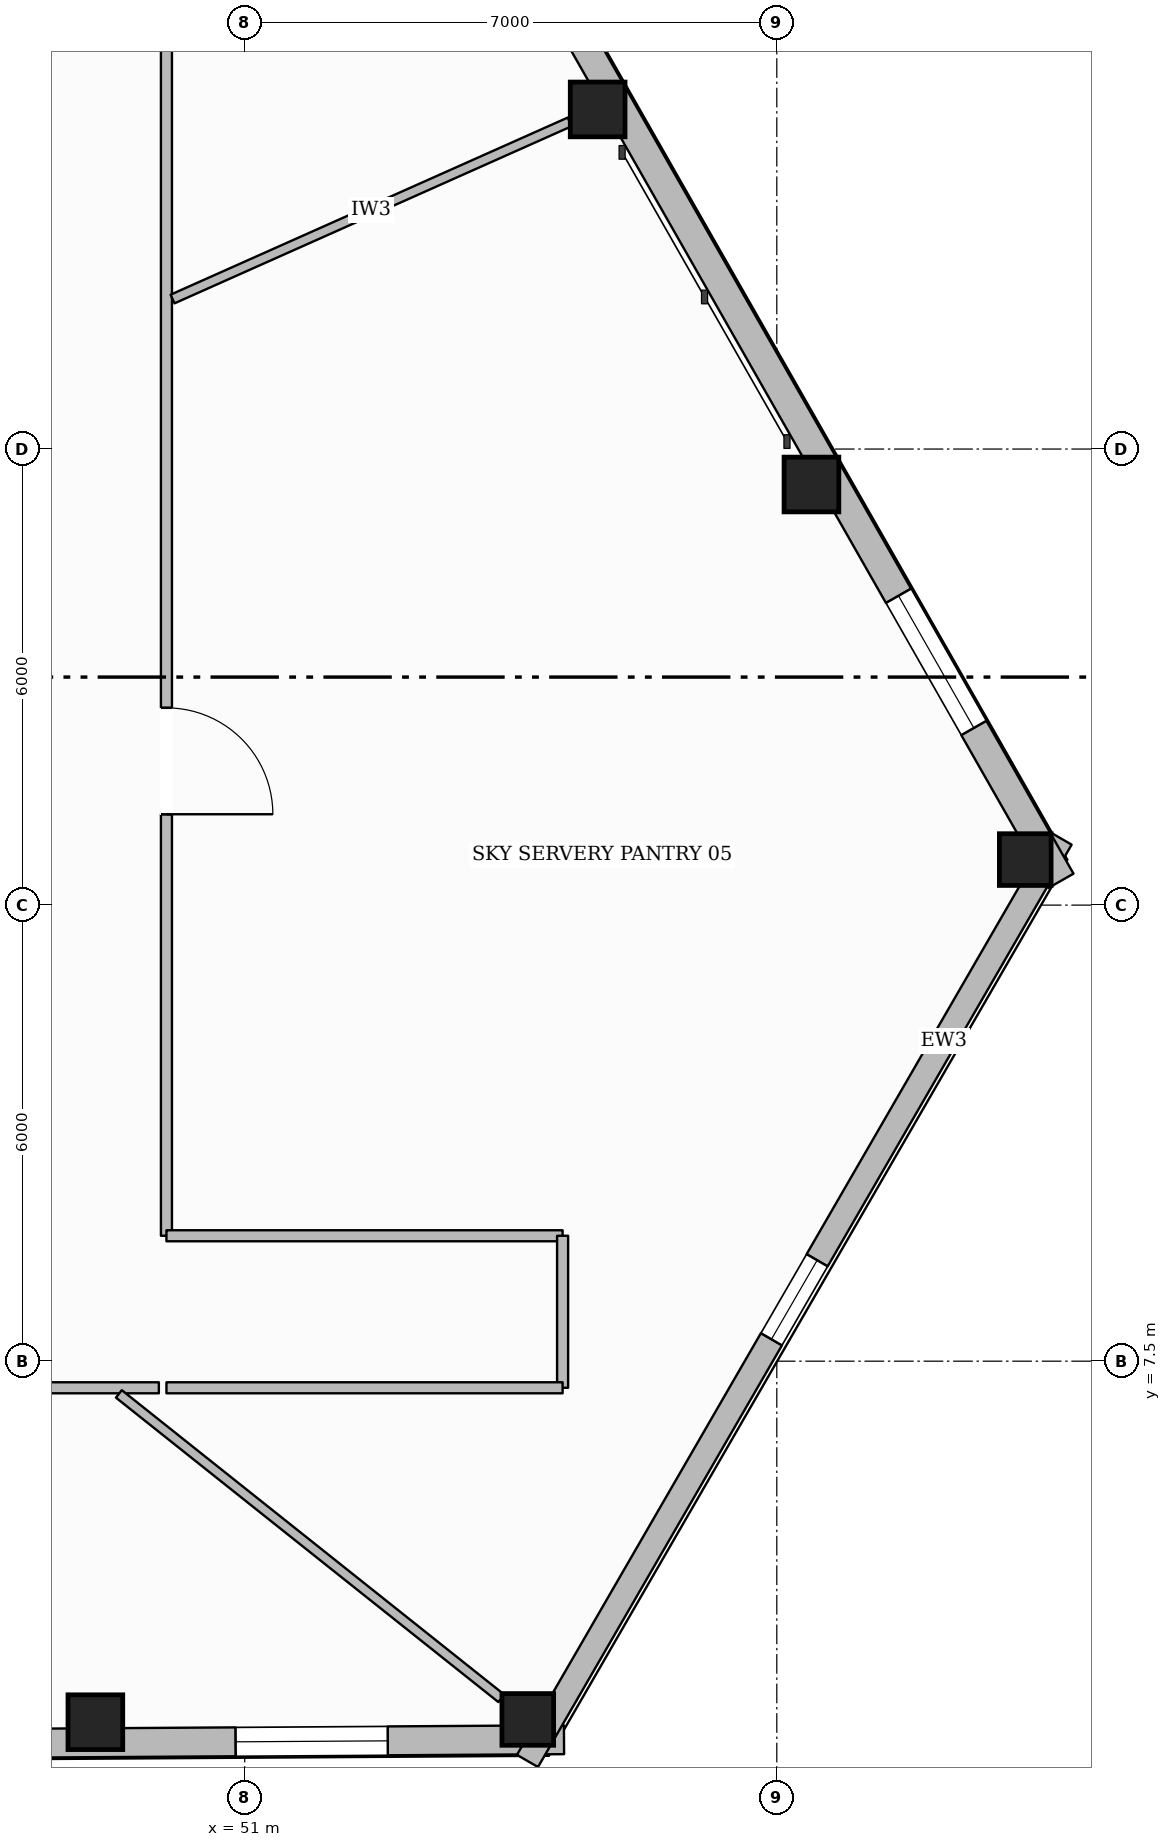
"""IFC4 building model, lengths in metres.
Left out: names, types, materials, properties, quantities, classifications, styles, units other than length and angle.
Written with IfcOpenShell. Run it as: python <this file> out.ifc"""

import sys

from ifc_helpers import new_model, si_unit, direction, frame, frame_2d, origin, origin_2d, place, context, subcontext, project, spatial, rectangle, hollow_rectangle, extrude, element, fill, save


model = new_model("IFC4")
c1 = context("Model", 3, precision=1e-05, world=origin(), true_north=direction((0.0, 1.0)))
c2 = subcontext(c1, "Body", "Model", "MODEL_VIEW")
j1 = project(units=[si_unit("LENGTHUNIT", "METRE"), si_unit("PLANEANGLEUNIT", "RADIAN")], contexts=[c1])
p1 = place(None, origin())
s1 = spatial("IfcSite", under=j1, at=p1, CompositionType="ELEMENT")
p2 = place(p1, origin())
s2 = spatial("IfcBuilding", under=s1, at=p2, CompositionType="ELEMENT")
p3 = place(p2, frame((0.0, 0.0, 80.5)))
s3 = spatial("IfcBuildingStorey", under=s2, at=p3, CompositionType="ELEMENT", Elevation=80.5)
p4 = place(p3, frame((49.035, 2.75, 0.0), z_axis=(0.0, 0.0, 1.0), x_axis=(1.0, 0.0, 0.0)))
e1 = element("IfcColumn", 1, at=p4, inside=s3, PredefinedType="COLUMN", context=c2, shape_type="SweptSolid", body=[
    extrude(hollow_rectangle(XDim=0.72, YDim=0.72, WallThickness=0.032, at=origin_2d()), origin(), (0.0, 0.0, 1.0), 4.75),
])
for number, where, z_axis, x_axis in (
    (2, (54.724, 2.787, 0.0), (0.0, 0.0, 1.0), (1.0, 0.0, 0.0)),
    (3, (61.268, 14.099, 0.0), (0.0, 0.0, 1.0), (1.0, 0.0, 0.0)),
):
    element("IfcColumn", number, at=place(p3, frame(where, z_axis=z_axis, x_axis=x_axis)), inside=s3, PredefinedType="COLUMN", context=c2, shape_type="SweptSolid", body=[
        extrude(hollow_rectangle(XDim=0.68, YDim=0.68, WallThickness=0.03, at=origin_2d()), origin(), (0.0, 0.0, 1.0), 4.75),
    ])
for number, where, z_axis, x_axis in (
    (4, (58.456, 19.033, 0.0), (0.0, 0.0, 1.0), (1.0, 0.0, 0.0)),
    (5, (55.643, 23.968, 0.0), (0.0, 0.0, 1.0), (1.0, 0.0, 0.0)),
):
    element("IfcColumn", number, at=place(p3, frame(where, z_axis=z_axis, x_axis=x_axis)), inside=s3, PredefinedType="COLUMN", context=c2, shape_type="SweptSolid", body=[
        extrude(hollow_rectangle(XDim=0.72, YDim=0.72, WallThickness=0.032, at=origin_2d()), origin(), (0.0, 0.0, 1.0), 4.75),
    ])
p5 = place(p3, frame((55.2, 2.52, 0.0), z_axis=(0.0, 0.0, 1.0), x_axis=(-0.999979379683, -0.006421854009, 0.0)))
e6 = element("IfcWall", 6, at=p5, inside=s3, PredefinedType="STANDARD", context=c2, shape_type="SweptSolid", body=[
    extrude(rectangle(XDim=35.09, YDim=0.38, at=frame_2d((17.545, 0.0))), origin(), (0.0, 0.0, 1.0), 4.209),
])
p6 = place(p5, frame((30.765, 0.0, 0.65)))
e7 = element("IfcOpeningElement", 7, at=p6, cuts=e6, PredefinedType="OPENING", context=c2, shape_type="SweptSolid", body=[
    extrude(rectangle(XDim=2.0, YDim=2.25, at=frame_2d((1.0, 1.125))), frame((0.0, 0.2, 0.0), z_axis=(0.0, -1.0, 0.0), x_axis=(1.0, 0.0, 0.0)), (0.0, 0.0, 1.0), 0.4),
])
p7 = place(p5, frame((2.319, 0.0, 0.65)))
e8 = element("IfcOpeningElement", 8, at=p7, cuts=e6, PredefinedType="OPENING", context=c2, shape_type="SweptSolid", body=[
    extrude(rectangle(XDim=2.0, YDim=2.25, at=frame_2d((1.0, 1.125))), frame((0.0, 0.2, 0.0), z_axis=(0.0, -1.0, 0.0), x_axis=(1.0, 0.0, 0.0)), (0.0, 0.0, 1.0), 0.4),
])
p8 = place(p3, frame((61.74, 14.375, 0.0), z_axis=(0.0, 0.0, 1.0), x_axis=(-0.50077538948, -0.865577269394, 0.0)))
e9 = element("IfcWall", 9, at=p8, inside=s3, PredefinedType="STANDARD", context=c2, shape_type="SweptSolid", body=[
    extrude(rectangle(XDim=14.019, YDim=0.32, at=frame_2d((7.01, 0.0))), origin(), (0.0, 0.0, 1.0), 4.209),
])
p9 = place(p8, frame((6.41, 0.0, 0.65)))
e10 = element("IfcOpeningElement", 10, at=p9, cuts=e9, PredefinedType="OPENING", context=c2, shape_type="SweptSolid", body=[
    extrude(rectangle(XDim=1.2, YDim=1.7, at=frame_2d((0.6, 0.85))), frame((0.0, 0.17, 0.0), z_axis=(0.0, -1.0, 0.0), x_axis=(1.0, 0.0, 0.0)), (0.0, 0.0, 1.0), 0.34),
])
p10 = place(p3, frame((44.389, 44.257, 0.0), z_axis=(0.0, 0.0, 1.0), x_axis=(0.495210354805, -0.868773102999, 0.0)))
e11 = element("IfcWall", 11, at=p10, inside=s3, PredefinedType="STANDARD", context=c2, shape_type="SweptSolid", body=[
    extrude(rectangle(XDim=35.035, YDim=0.38, at=frame_2d((17.518, 0.0))), origin(), (0.0, 0.0, 1.0), 4.209),
])
p11 = place(p10, frame((30.72, 0.0, 0.65)))
e12 = element("IfcOpeningElement", 12, at=p11, cuts=e11, PredefinedType="OPENING", context=c2, shape_type="SweptSolid", body=[
    extrude(rectangle(XDim=2.0, YDim=2.25, at=frame_2d((1.0, 1.125))), frame((0.0, 0.2, 0.0), z_axis=(0.0, -1.0, 0.0), x_axis=(1.0, 0.0, 0.0)), (0.0, 0.0, 1.0), 0.4),
])
p12 = place(p10, frame((2.321, 0.0, 0.65)))
e13 = element("IfcOpeningElement", 13, at=p12, cuts=e11, PredefinedType="OPENING", context=c2, shape_type="SweptSolid", body=[
    extrude(rectangle(XDim=2.0, YDim=2.25, at=frame_2d((1.0, 1.125))), frame((0.0, 0.2, 0.0), z_axis=(0.0, -1.0, 0.0), x_axis=(1.0, 0.0, 0.0)), (0.0, 0.0, 1.0), 0.4),
])
p13 = place(p3, frame((49.97, 25.05, 0.0), z_axis=(0.0, 0.0, 1.0), x_axis=(0.0, -1.0, 0.0)))
e14 = element("IfcWall", 14, at=p13, inside=s3, PredefinedType="PARTITIONING", context=c2, shape_type="SweptSolid", body=[
    extrude(rectangle(XDim=15.9, YDim=0.145, at=frame_2d((7.95, 0.0))), origin(), (0.0, 0.0, 1.0), 4.438),
])
p14 = place(p13, frame((8.955, 0.0, 0.0)))
e15 = element("IfcOpeningElement", 15, at=p14, cuts=e14, PredefinedType="OPENING", context=c2, shape_type="SweptSolid", body=[
    extrude(rectangle(XDim=1.4, YDim=2.2, at=frame_2d((0.7, 1.1))), frame((0.0, 0.083, 0.0), z_axis=(0.0, -1.0, 0.0), x_axis=(1.0, 0.0, 0.0)), (0.0, 0.0, 1.0), 0.165),
])
p15 = place(p3, frame((49.97, 9.15, 0.0), z_axis=(0.0, 0.0, 1.0), x_axis=(1.0, 0.0, 0.0)))
e16 = element("IfcWall", 16, at=p15, inside=s3, PredefinedType="PARTITIONING", context=c2, shape_type="SweptSolid", body=[
    extrude(rectangle(XDim=5.212, YDim=0.145, at=frame_2d((2.606, 0.0))), origin(), (0.0, 0.0, 1.0), 4.75),
])
p16 = place(p3, frame((55.182, 9.15, 0.0), z_axis=(0.0, 0.0, 1.0), x_axis=(0.0, -1.0, 0.0)))
e17 = element("IfcWall", 17, at=p16, inside=s3, PredefinedType="PARTITIONING", context=c2, shape_type="SweptSolid", body=[
    extrude(rectangle(XDim=2.0, YDim=0.145, at=frame_2d((1.0, 0.0))), origin(), (0.0, 0.0, 1.0), 4.75),
])
p17 = place(p3, frame((55.182, 7.15, 0.0), z_axis=(0.0, 0.0, 1.0), x_axis=(-1.0, 0.0, 0.0)))
e18 = element("IfcWall", 18, at=p17, inside=s3, PredefinedType="PARTITIONING", context=c2, shape_type="SweptSolid", body=[
    extrude(rectangle(XDim=5.212, YDim=0.145, at=frame_2d((2.606, 0.0))), origin(), (0.0, 0.0, 1.0), 4.75),
])
p18 = place(p3, frame((49.87, 7.15, 0.0), z_axis=(0.0, 0.0, 1.0), x_axis=(-1.0, 0.0, 0.0)))
e19 = element("IfcWall", 19, at=p18, inside=s3, PredefinedType="PARTITIONING", context=c2, shape_type="SweptSolid", body=[
    extrude(rectangle(XDim=23.74, YDim=0.145, at=frame_2d((11.87, 0.0))), origin(), (0.0, 0.0, 1.0), 4.75),
])
p19 = place(p18, frame((18.43, 0.0, 0.0)))
e20 = element("IfcOpeningElement", 20, at=p19, cuts=e19, PredefinedType="OPENING", context=c2, shape_type="SweptSolid", body=[
    extrude(rectangle(XDim=0.88, YDim=2.1, at=frame_2d((0.44, 1.05))), frame((0.0, 0.083, 0.0), z_axis=(0.0, -1.0, 0.0), x_axis=(1.0, 0.0, 0.0)), (0.0, 0.0, 1.0), 0.165),
])
p20 = place(p18, frame((15.91, 0.0, 0.0)))
e21 = element("IfcOpeningElement", 21, at=p20, cuts=e19, PredefinedType="OPENING", context=c2, shape_type="SweptSolid", body=[
    extrude(rectangle(XDim=0.88, YDim=2.1, at=frame_2d((0.44, 1.05))), frame((0.0, 0.083, 0.0), z_axis=(0.0, -1.0, 0.0), x_axis=(1.0, 0.0, 0.0)), (0.0, 0.0, 1.0), 0.165),
])
p21 = place(p18, frame((13.45, 0.0, 0.0)))
e22 = element("IfcOpeningElement", 22, at=p21, cuts=e19, PredefinedType="OPENING", context=c2, shape_type="SweptSolid", body=[
    extrude(rectangle(XDim=0.96, YDim=2.1, at=frame_2d((0.48, 1.05))), frame((0.0, 0.083, 0.0), z_axis=(0.0, -1.0, 0.0), x_axis=(1.0, 0.0, 0.0)), (0.0, 0.0, 1.0), 0.165),
])
p22 = place(p18, frame((5.857, 0.0, 0.0)))
e23 = element("IfcOpeningElement", 23, at=p22, cuts=e19, PredefinedType="OPENING", context=c2, shape_type="SweptSolid", body=[
    extrude(rectangle(XDim=1.02, YDim=2.15, at=frame_2d((0.51, 1.075))), frame((0.0, 0.083, 0.0), z_axis=(0.0, -1.0, 0.0), x_axis=(1.0, 0.0, 0.0)), (0.0, 0.0, 1.0), 0.165),
])
p23 = place(p3, frame((50.051, 21.474, 0.0), z_axis=(0.0, 0.0, 1.0), x_axis=(0.91329866802, 0.407290489692, 0.0)))
e24 = element("IfcWall", 24, at=p23, inside=s3, PredefinedType="PARTITIONING", context=c2, shape_type="SweptSolid", body=[
    extrude(rectangle(XDim=5.72, YDim=0.125, at=frame_2d((2.86, 0.0))), origin(), (0.0, 0.0, 1.0), 4.291),
])
p24 = place(p3, frame((49.344, 7.07, 0.0), z_axis=(0.0, 0.0, 1.0), x_axis=(0.782366462382, -0.622818367215, 0.0)))
e25 = element("IfcWall", 25, at=p24, inside=s3, PredefinedType="PARTITIONING", context=c2, shape_type="SweptSolid", body=[
    extrude(rectangle(XDim=6.431, YDim=0.125, at=frame_2d((3.216, 0.0))), origin(), (0.0, 0.0, 1.0), 4.291),
])
p25 = place(p7, origin())
e26 = element("IfcWindow", 26, at=p25, inside=s3, PartitioningType="SINGLE_PANEL", PredefinedType="WINDOW", context=c2, shape_type="SweptSolid", body=[
    extrude(rectangle(XDim=2.0, YDim=2.25, at=frame_2d((1.0, 1.125))), frame((0.0, 0.03, 0.0), z_axis=(0.0, -1.0, 0.0), x_axis=(1.0, 0.0, 0.0)), (0.0, 0.0, 1.0), 0.06),
])
fill(e8, e26)
p26 = place(p11, origin())
e27 = element("IfcWindow", 27, at=p26, inside=s3, PartitioningType="SINGLE_PANEL", PredefinedType="WINDOW", context=c2, shape_type="SweptSolid", body=[
    extrude(rectangle(XDim=2.0, YDim=2.25, at=frame_2d((1.0, 1.125))), frame((0.0, 0.03, 0.0), z_axis=(0.0, -1.0, 0.0), x_axis=(1.0, 0.0, 0.0)), (0.0, 0.0, 1.0), 0.06),
])
fill(e12, e27)
p27 = place(p9, origin())
e28 = element("IfcWindow", 28, at=p27, inside=s3, PartitioningType="SINGLE_PANEL", PredefinedType="WINDOW", context=c2, shape_type="SweptSolid", body=[
    extrude(rectangle(XDim=1.2, YDim=1.7, at=frame_2d((0.6, 0.85))), frame((0.0, 0.03, 0.0), z_axis=(0.0, -1.0, 0.0), x_axis=(1.0, 0.0, 0.0)), (0.0, 0.0, 1.0), 0.06),
])
fill(e10, e28)
p28 = place(p14, origin())
e29 = element("IfcDoor", 29, at=p28, inside=s3, OperationType="SINGLE_SWING_RIGHT", PredefinedType="DOOR", context=c2, shape_type="SweptSolid", body=[
    extrude(rectangle(XDim=1.4, YDim=2.2, at=frame_2d((0.7, 1.1))), frame((0.0, 0.025, 0.0), z_axis=(0.0, -1.0, 0.0), x_axis=(1.0, 0.0, 0.0)), (0.0, 0.0, 1.0), 0.05),
])
fill(e15, e29)
save(model, sys.argv[1])
